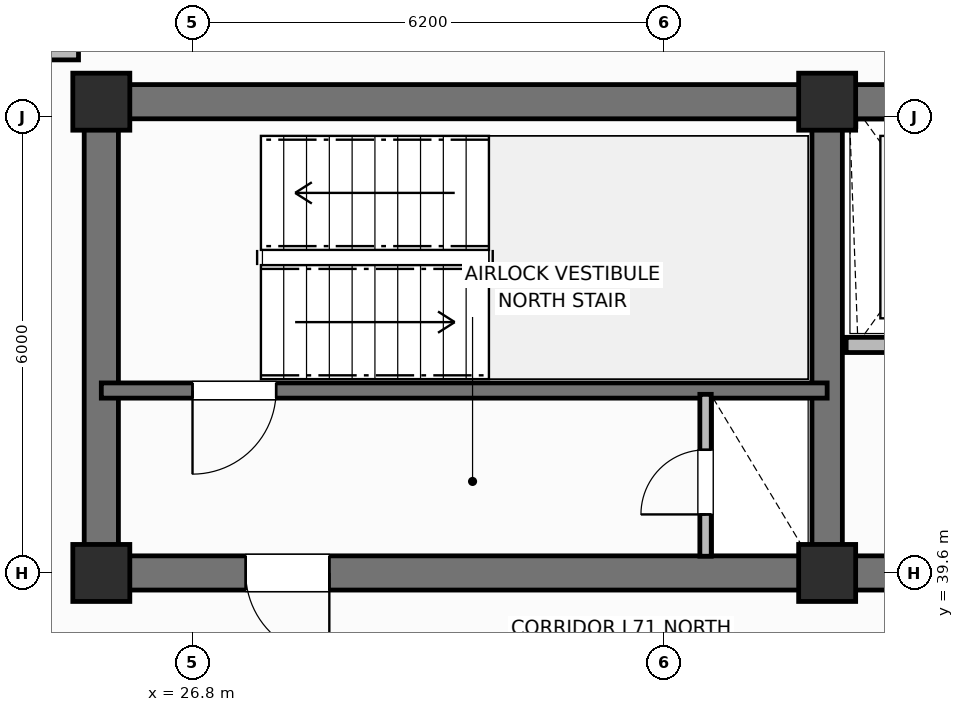
"""IFC4 building model, lengths in metres.
Left out: names, types, materials, properties, quantities, classifications, styles, units other than length and angle.
Written with IfcOpenShell. Run it as: python <this file> out.ifc"""

import sys

from ifc_helpers import new_model, si_unit, direction, frame, frame_2d, origin, origin_2d, place, context, subcontext, project, spatial, rectangle, extrude, element, fill, save


model = new_model("IFC4")
c1 = context("Model", 3, precision=1e-05, world=origin(), true_north=direction((0.0, 1.0)))
c2 = subcontext(c1, "Body", "Model", "MODEL_VIEW")
j1 = project(units=[si_unit("LENGTHUNIT", "METRE"), si_unit("PLANEANGLEUNIT", "RADIAN")], contexts=[c1])
p1 = place(None, origin())
s1 = spatial("IfcSite", under=j1, at=p1, CompositionType="ELEMENT")
p2 = place(p1, origin())
s2 = spatial("IfcBuilding", under=s1, at=p2, CompositionType="ELEMENT")
p3 = place(p2, frame((0.0, 0.0, 282.4)))
s3 = spatial("IfcBuildingStorey", under=s2, at=p3, CompositionType="ELEMENT", Elevation=282.4)
p4 = place(p3, frame((25.6, 45.8, 0.0), z_axis=(0.0, 0.0, 1.0), x_axis=(1.0, 0.0, 0.0)))
e1 = element("IfcWall", 1, at=p4, inside=s3, PredefinedType="SHEAR", context=c2, shape_type="SweptSolid", body=[
    extrude(rectangle(XDim=27.2, YDim=0.45, at=frame_2d((13.6, 0.0))), origin(), (0.0, 0.0, 1.0), 3.7),
])
p5 = place(p3, frame((25.6, 39.825, 0.0), z_axis=(0.0, 0.0, 1.0), x_axis=(0.0, 1.0, 0.0)))
e2 = element("IfcWall", 2, at=p5, inside=s3, PredefinedType="SHEAR", context=c2, shape_type="SweptSolid", body=[
    extrude(rectangle(XDim=5.75, YDim=0.45, at=frame_2d((2.875, 0.0))), origin(), (0.0, 0.0, 1.0), 3.7),
])
p6 = place(p3, frame((52.8, 39.6, 0.0), z_axis=(0.0, 0.0, 1.0), x_axis=(-1.0, 0.0, 0.0)))
e3 = element("IfcWall", 3, at=p6, inside=s3, PredefinedType="SHEAR", context=c2, shape_type="SweptSolid", body=[
    extrude(rectangle(XDim=27.2, YDim=0.45, at=frame_2d((13.6, 0.0))), origin(), (0.0, 0.0, 1.0), 3.7),
])
p7 = place(p6, frame((24.2, 0.0, 0.0)))
e4 = element("IfcOpeningElement", 4, at=p7, cuts=e3, PredefinedType="OPENING", context=c2, shape_type="SweptSolid", body=[
    extrude(rectangle(XDim=1.1, YDim=2.15, at=frame_2d((0.55, 1.075))), frame((0.0, 0.235, 0.0), z_axis=(0.0, -1.0, 0.0), x_axis=(1.0, 0.0, 0.0)), (0.0, 0.0, 1.0), 0.47),
])
p8 = place(p6, frame((15.1, 0.0, 0.0)))
e5 = element("IfcOpeningElement", 5, at=p8, cuts=e3, PredefinedType="OPENING", context=c2, shape_type="SweptSolid", body=[
    extrude(rectangle(XDim=1.2, YDim=2.15, at=frame_2d((0.6, 1.075))), frame((0.0, 0.235, 0.0), z_axis=(0.0, -1.0, 0.0), x_axis=(1.0, 0.0, 0.0)), (0.0, 0.0, 1.0), 0.47),
])
p9 = place(p6, frame((11.6, 0.0, 0.0)))
e6 = element("IfcOpeningElement", 6, at=p9, cuts=e3, PredefinedType="OPENING", context=c2, shape_type="SweptSolid", body=[
    extrude(rectangle(XDim=0.9, YDim=2.1, at=frame_2d((0.45, 1.05))), frame((0.0, 0.235, 0.0), z_axis=(0.0, -1.0, 0.0), x_axis=(1.0, 0.0, 0.0)), (0.0, 0.0, 1.0), 0.47),
])
p10 = place(p6, frame((7.35, 0.0, 0.0)))
e7 = element("IfcOpeningElement", 7, at=p10, cuts=e3, PredefinedType="OPENING", context=c2, shape_type="SweptSolid", body=[
    extrude(rectangle(XDim=0.85, YDim=2.1, at=frame_2d((0.425, 1.05))), frame((0.0, 0.235, 0.0), z_axis=(0.0, -1.0, 0.0), x_axis=(1.0, 0.0, 0.0)), (0.0, 0.0, 1.0), 0.47),
])
p11 = place(p6, frame((4.2, 0.0, 0.0)))
e8 = element("IfcOpeningElement", 8, at=p11, cuts=e3, PredefinedType="OPENING", context=c2, shape_type="SweptSolid", body=[
    extrude(rectangle(XDim=1.3, YDim=2.2, at=frame_2d((0.65, 1.1))), frame((0.0, 0.235, 0.0), z_axis=(0.0, -1.0, 0.0), x_axis=(1.0, 0.0, 0.0)), (0.0, 0.0, 1.0), 0.47),
])
p12 = place(p3, frame((35.15, 39.825, 0.0), z_axis=(0.0, 0.0, 1.0), x_axis=(0.0, 1.0, 0.0)))
e9 = element("IfcWall", 9, at=p12, inside=s3, PredefinedType="SHEAR", context=c2, shape_type="SweptSolid", body=[
    extrude(rectangle(XDim=5.75, YDim=0.4, at=frame_2d((2.875, 0.0))), origin(), (0.0, 0.0, 1.0), 3.7),
])
for number, where, z_axis, x_axis in (
    (10, (25.6, 39.6, 0.0), (0.0, 0.0, 1.0), (1.0, 0.0, 0.0)),
    (11, (25.6, 45.8, 0.0), (0.0, 0.0, 1.0), (1.0, 0.0, 0.0)),
    (12, (35.15, 39.6, 0.0), (0.0, 0.0, 1.0), (1.0, 0.0, 0.0)),
    (13, (35.15, 45.8, 0.0), (0.0, 0.0, 1.0), (1.0, 0.0, 0.0)),
):
    element("IfcColumn", number, at=place(p3, frame(where, z_axis=z_axis, x_axis=x_axis)), inside=s3, PredefinedType="COLUMN", context=c2, shape_type="SweptSolid", body=[
        extrude(rectangle(XDim=0.75, YDim=0.75, at=origin_2d()), origin(), (0.0, 0.0, 1.0), 3.7),
    ])
p13 = place(p3, frame((35.15, 42.0, 0.0), z_axis=(0.0, 0.0, 1.0), x_axis=(-1.0, 0.0, 0.0)))
e14 = element("IfcWall", 14, at=p13, inside=s3, PredefinedType="SHEAR", context=c2, shape_type="SweptSolid", body=[
    extrude(rectangle(XDim=9.55, YDim=0.2, at=frame_2d((4.775, 0.0))), origin(), (0.0, 0.0, 1.0), 3.7),
])
p14 = place(p13, frame((7.25, 0.0, 0.0)))
e15 = element("IfcOpeningElement", 15, at=p14, cuts=e14, PredefinedType="OPENING", context=c2, shape_type="SweptSolid", body=[
    extrude(rectangle(XDim=1.1, YDim=2.15, at=frame_2d((0.55, 1.075))), frame((0.0, 0.11, 0.0), z_axis=(0.0, -1.0, 0.0), x_axis=(1.0, 0.0, 0.0)), (0.0, 0.0, 1.0), 0.22),
])
p15 = place(p3, frame((33.55, 39.82, 0.0), z_axis=(0.0, 0.0, 1.0), x_axis=(0.0, 1.0, 0.0)))
e16 = element("IfcWall", 16, at=p15, inside=s3, PredefinedType="PARTITIONING", context=c2, shape_type="SweptSolid", body=[
    extrude(rectangle(XDim=2.13, YDim=0.15, at=frame_2d((1.065, 0.0))), origin(), (0.0, 0.0, 1.0), 2.56),
])
p16 = place(p15, frame((0.55, 0.0, 0.0)))
e17 = element("IfcOpeningElement", 17, at=p16, cuts=e16, PredefinedType="OPENING", context=c2, shape_type="SweptSolid", body=[
    extrude(rectangle(XDim=0.85, YDim=2.05, at=frame_2d((0.425, 1.025))), frame((0.0, 0.085, 0.0), z_axis=(0.0, -1.0, 0.0), x_axis=(1.0, 0.0, 0.0)), (0.0, 0.0, 1.0), 0.17),
])
p17 = place(p3, frame((37.95, 42.6, 0.0), z_axis=(0.0, 0.0, 1.0), x_axis=(-1.0, 0.0, 0.0)))
e18 = element("IfcWall", 18, at=p17, inside=s3, PredefinedType="PARTITIONING", context=c2, shape_type="SweptSolid", body=[
    extrude(rectangle(XDim=2.55, YDim=0.2, at=frame_2d((1.275, 0.0))), origin(), (0.0, 0.0, 1.0), 2.33),
])
p18 = place(p17, frame((0.75, 0.0, 0.0)))
e19 = element("IfcOpeningElement", 19, at=p18, cuts=e18, PredefinedType="OPENING", context=c2, shape_type="SweptSolid", body=[
    extrude(rectangle(XDim=1.1, YDim=2.15, at=frame_2d((0.55, 1.075))), frame((0.0, 0.11, 0.0), z_axis=(0.0, -1.0, 0.0), x_axis=(1.0, 0.0, 0.0)), (0.0, 0.0, 1.0), 0.22),
])
p19 = place(p3, frame((21.546, 46.45, 0.0), z_axis=(0.0, 0.0, 1.0), x_axis=(1.0, 0.0, 0.0)))
e20 = element("IfcWall", 20, at=p19, inside=s3, PredefinedType="PARTITIONING", context=c2, shape_type="SweptSolid", body=[
    extrude(rectangle(XDim=3.754, YDim=0.2, at=frame_2d((1.877, 0.0))), origin(), (0.0, 0.0, 1.0), 2.56),
])
p20 = place(p14, origin())
e21 = element("IfcDoor", 21, at=p20, inside=s3, OperationType="SINGLE_SWING_RIGHT", PredefinedType="DOOR", context=c2, shape_type="SweptSolid", body=[
    extrude(rectangle(XDim=1.1, YDim=2.15, at=frame_2d((0.55, 1.075))), frame((0.0, 0.025, 0.0), z_axis=(0.0, -1.0, 0.0), x_axis=(1.0, 0.0, 0.0)), (0.0, 0.0, 1.0), 0.05),
])
fill(e15, e21)
p21 = place(p16, origin())
e22 = element("IfcDoor", 22, at=p21, inside=s3, OperationType="SINGLE_SWING_LEFT", PredefinedType="TRAPDOOR", context=c2, shape_type="SweptSolid", body=[
    extrude(rectangle(XDim=0.85, YDim=2.05, at=frame_2d((0.425, 1.025))), frame((0.0, 0.025, 0.0), z_axis=(0.0, -1.0, 0.0), x_axis=(1.0, 0.0, 0.0)), (0.0, 0.0, 1.0), 0.05),
])
fill(e17, e22)
p22 = place(p7, origin())
e23 = element("IfcDoor", 23, at=p22, inside=s3, OperationType="SINGLE_SWING_LEFT", PredefinedType="DOOR", context=c2, shape_type="SweptSolid", body=[
    extrude(rectangle(XDim=1.1, YDim=2.15, at=frame_2d((0.55, 1.075))), frame((0.0, 0.025, 0.0), z_axis=(0.0, -1.0, 0.0), x_axis=(1.0, 0.0, 0.0)), (0.0, 0.0, 1.0), 0.05),
])
fill(e4, e23)
save(model, sys.argv[1])
